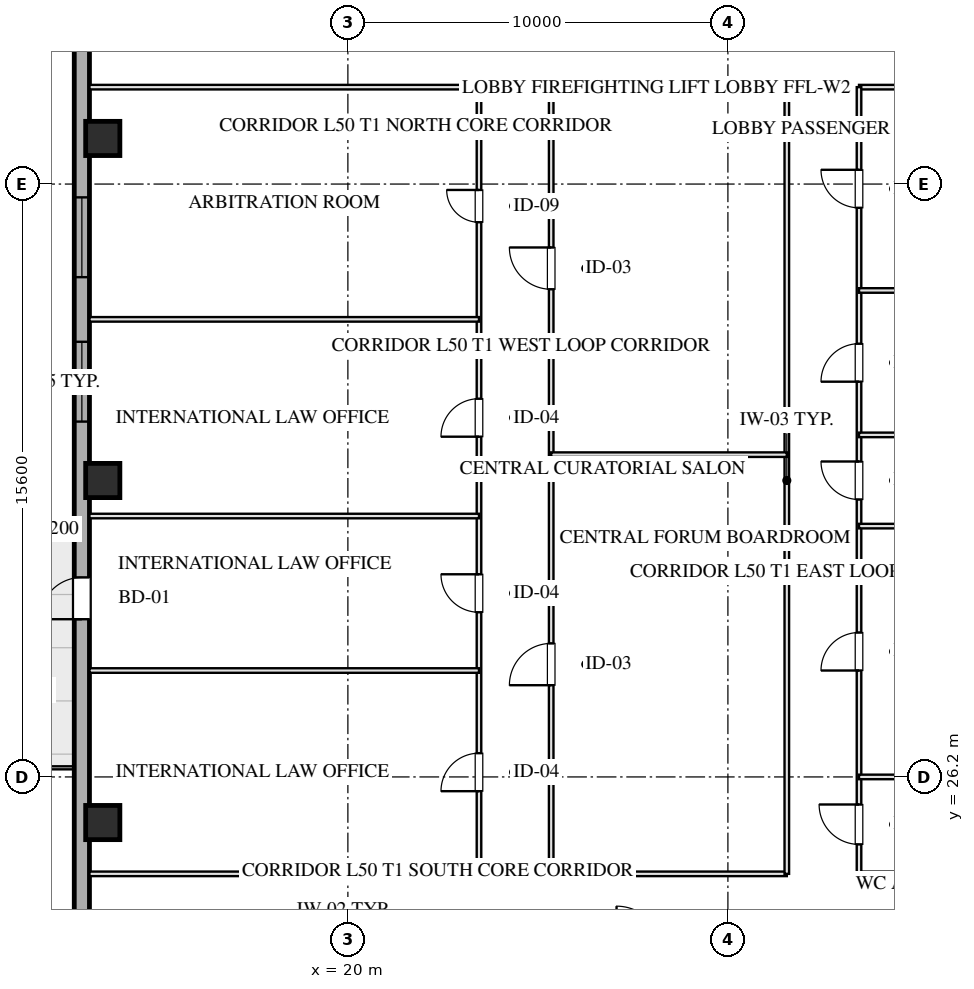
"""IFC4 building model, lengths in metres.
Left out: names, types, materials, properties, quantities, classifications, styles, units other than length and angle.
Written with IfcOpenShell. Run it as: python <this file> out.ifc"""

import sys

from ifc_helpers import new_model, si_unit, direction, frame, frame_2d, origin, origin_2d, place, context, subcontext, project, spatial, rectangle, hollow_rectangle, extrude, element, fill, save


model = new_model("IFC4")
c1 = context("Model", 3, precision=1e-05, world=origin(), true_north=direction((0.0, 1.0)))
c2 = subcontext(c1, "Body", "Model", "MODEL_VIEW")
j1 = project(units=[si_unit("LENGTHUNIT", "METRE"), si_unit("PLANEANGLEUNIT", "RADIAN")], contexts=[c1])
p1 = place(None, origin())
s1 = spatial("IfcSite", under=j1, at=p1, CompositionType="ELEMENT")
p2 = place(p1, origin())
s2 = spatial("IfcBuilding", under=s1, at=p2, CompositionType="ELEMENT")
p3 = place(p2, frame((0.0, 0.0, 188.6)))
s3 = spatial("IfcBuildingStorey", under=s2, at=p3, CompositionType="ELEMENT", Elevation=188.6)
for number, where, z_axis, x_axis in (
    (1, (13.55, 25.0, 0.0), (0.0, 0.0, 1.0), (1.0, 0.0, 0.0)),
    (2, (13.55, 34.0, 0.0), (0.0, 0.0, 1.0), (1.0, 0.0, 0.0)),
    (3, (13.55, 43.0, 0.0), (0.0, 0.0, 1.0), (1.0, 0.0, 0.0)),
):
    element("IfcColumn", number, at=place(p3, frame(where, z_axis=z_axis, x_axis=x_axis)), inside=s3, PredefinedType="COLUMN", context=c2, shape_type="SweptSolid", body=[
        extrude(hollow_rectangle(XDim=0.9, YDim=0.9, WallThickness=0.032, at=origin_2d()), origin(), (0.0, 0.0, 1.0), 3.451),
    ])
p4 = place(p3, frame((13.0, 10.8, 0.0), z_axis=(0.0, 0.0, 1.0), x_axis=(0.0, 1.0, 0.0)))
e4 = element("IfcWall", 4, at=p4, inside=s3, PredefinedType="SOLIDWALL", context=c2, shape_type="SweptSolid", body=[
    extrude(rectangle(XDim=46.4, YDim=0.4, at=frame_2d((23.2, 0.0))), origin(), (0.0, 0.0, 1.0), 2.61),
])
p5 = place(p4, frame((24.75, 0.0, 0.75)))
e5 = element("IfcOpeningElement", 5, at=p5, cuts=e4, PredefinedType="OPENING", context=c2, shape_type="SweptSolid", body=[
    extrude(rectangle(XDim=2.1, YDim=1.46, at=frame_2d((1.05, 0.73))), frame((0.0, 0.21, 0.0), z_axis=(0.0, -1.0, 0.0), x_axis=(1.0, 0.0, 0.0)), (0.0, 0.0, 1.0), 0.42),
])
p6 = place(p4, frame((28.55, 0.0, 0.75)))
e6 = element("IfcOpeningElement", 6, at=p6, cuts=e4, PredefinedType="OPENING", context=c2, shape_type="SweptSolid", body=[
    extrude(rectangle(XDim=2.1, YDim=1.46, at=frame_2d((1.05, 0.73))), frame((0.0, 0.21, 0.0), z_axis=(0.0, -1.0, 0.0), x_axis=(1.0, 0.0, 0.0)), (0.0, 0.0, 1.0), 0.42),
])
p7 = place(p4, frame((19.55, 0.0, 0.0)))
e7 = element("IfcOpeningElement", 7, at=p7, cuts=e4, PredefinedType="OPENING", context=c2, shape_type="SweptSolid", body=[
    extrude(rectangle(XDim=1.1, YDim=2.15, at=frame_2d((0.55, 1.075))), frame((0.0, 0.21, 0.0), z_axis=(0.0, -1.0, 0.0), x_axis=(1.0, 0.0, 0.0)), (0.0, 0.0, 1.0), 0.42),
])
p8 = place(p3, frame((13.2, 23.65, 0.0), z_axis=(0.0, 0.0, 1.0), x_axis=(1.0, 0.0, 0.0)))
e8 = element("IfcWall", 8, at=p8, inside=s3, PredefinedType="PARTITIONING", context=c2, shape_type="SweptSolid", body=[
    extrude(rectangle(XDim=10.25, YDim=0.12, at=frame_2d((5.125, 0.0))), origin(), (0.0, 0.0, 1.0), 3.175),
])
p9 = place(p3, frame((25.35, 23.65, 0.0), z_axis=(0.0, 0.0, 1.0), x_axis=(1.0, 0.0, 0.0)))
e9 = element("IfcWall", 9, at=p9, inside=s3, PredefinedType="PARTITIONING", context=c2, shape_type="SweptSolid", body=[
    extrude(rectangle(XDim=6.2, YDim=0.12, at=frame_2d((3.1, 0.0))), origin(), (0.0, 0.0, 1.0), 3.175),
])
p10 = place(p3, frame((33.45, 23.65, 0.0), z_axis=(0.0, 0.0, 1.0), x_axis=(1.0, 0.0, 0.0)))
e10 = element("IfcWall", 10, at=p10, inside=s3, PredefinedType="PARTITIONING", context=c2, shape_type="SweptSolid", body=[
    extrude(rectangle(XDim=13.35, YDim=0.12, at=frame_2d((6.675, 0.0))), origin(), (0.0, 0.0, 1.0), 3.175),
])
p11 = place(p3, frame((13.2, 44.35, 0.0), z_axis=(0.0, 0.0, 1.0), x_axis=(1.0, 0.0, 0.0)))
e11 = element("IfcWall", 11, at=p11, inside=s3, PredefinedType="PARTITIONING", context=c2, shape_type="SweptSolid", body=[
    extrude(rectangle(XDim=10.25, YDim=0.12, at=frame_2d((5.125, 0.0))), origin(), (0.0, 0.0, 1.0), 3.175),
])
p12 = place(p3, frame((25.35, 44.35, 0.0), z_axis=(0.0, 0.0, 1.0), x_axis=(1.0, 0.0, 0.0)))
e12 = element("IfcWall", 12, at=p12, inside=s3, PredefinedType="PARTITIONING", context=c2, shape_type="SweptSolid", body=[
    extrude(rectangle(XDim=6.2, YDim=0.12, at=frame_2d((3.1, 0.0))), origin(), (0.0, 0.0, 1.0), 3.175),
])
p13 = place(p3, frame((33.45, 44.35, 0.0), z_axis=(0.0, 0.0, 1.0), x_axis=(1.0, 0.0, 0.0)))
e13 = element("IfcWall", 13, at=p13, inside=s3, PredefinedType="PARTITIONING", context=c2, shape_type="SweptSolid", body=[
    extrude(rectangle(XDim=13.35, YDim=0.12, at=frame_2d((6.675, 0.0))), origin(), (0.0, 0.0, 1.0), 3.175),
])
p14 = place(p3, frame((23.45, 23.65, 0.0), z_axis=(0.0, 0.0, 1.0), x_axis=(0.0, 1.0, 0.0)))
e14 = element("IfcWall", 14, at=p14, inside=s3, PredefinedType="PARTITIONING", context=c2, shape_type="SweptSolid", body=[
    extrude(rectangle(XDim=20.7, YDim=0.12, at=frame_2d((10.35, 0.0))), origin(), (0.0, 0.0, 1.0), 3.175),
])
p15 = place(p14, frame((2.175, 0.0, 0.0)))
e15 = element("IfcOpeningElement", 15, at=p15, cuts=e14, PredefinedType="OPENING", context=c2, shape_type="SweptSolid", body=[
    extrude(rectangle(XDim=1.0, YDim=2.05, at=frame_2d((0.5, 1.025))), frame((0.0, 0.07, 0.0), z_axis=(0.0, -1.0, 0.0), x_axis=(1.0, 0.0, 0.0)), (0.0, 0.0, 1.0), 0.14),
])
p16 = place(p14, frame((6.883, 0.0, 0.0)))
e16 = element("IfcOpeningElement", 16, at=p16, cuts=e14, PredefinedType="OPENING", context=c2, shape_type="SweptSolid", body=[
    extrude(rectangle(XDim=1.0, YDim=2.05, at=frame_2d((0.5, 1.025))), frame((0.0, 0.07, 0.0), z_axis=(0.0, -1.0, 0.0), x_axis=(1.0, 0.0, 0.0)), (0.0, 0.0, 1.0), 0.14),
])
p17 = place(p14, frame((11.502, 0.0, 0.0)))
e17 = element("IfcOpeningElement", 17, at=p17, cuts=e14, PredefinedType="OPENING", context=c2, shape_type="SweptSolid", body=[
    extrude(rectangle(XDim=1.0, YDim=2.05, at=frame_2d((0.5, 1.025))), frame((0.0, 0.07, 0.0), z_axis=(0.0, -1.0, 0.0), x_axis=(1.0, 0.0, 0.0)), (0.0, 0.0, 1.0), 0.14),
])
p18 = place(p14, frame((17.145, 0.0, 0.0)))
e18 = element("IfcOpeningElement", 18, at=p18, cuts=e14, PredefinedType="OPENING", context=c2, shape_type="SweptSolid", body=[
    extrude(rectangle(XDim=0.85, YDim=2.05, at=frame_2d((0.425, 1.025))), frame((0.0, 0.07, 0.0), z_axis=(0.0, -1.0, 0.0), x_axis=(1.0, 0.0, 0.0)), (0.0, 0.0, 1.0), 0.14),
])
p19 = place(p3, frame((25.35, 23.65, 0.0), z_axis=(0.0, 0.0, 1.0), x_axis=(0.0, 1.0, 0.0)))
e19 = element("IfcWall", 19, at=p19, inside=s3, PredefinedType="PARTITIONING", context=c2, shape_type="SweptSolid", body=[
    extrude(rectangle(XDim=20.7, YDim=0.12, at=frame_2d((10.35, 0.0))), origin(), (0.0, 0.0, 1.0), 3.175),
])
p20 = place(p19, frame((4.963, 0.0, 0.0)))
e20 = element("IfcOpeningElement", 20, at=p20, cuts=e19, PredefinedType="OPENING", context=c2, shape_type="SweptSolid", body=[
    extrude(rectangle(XDim=1.1, YDim=2.05, at=frame_2d((0.55, 1.025))), frame((0.0, 0.07, 0.0), z_axis=(0.0, -1.0, 0.0), x_axis=(1.0, 0.0, 0.0)), (0.0, 0.0, 1.0), 0.14),
])
p21 = place(p19, frame((15.382, 0.0, 0.0)))
e21 = element("IfcOpeningElement", 21, at=p21, cuts=e19, PredefinedType="OPENING", context=c2, shape_type="SweptSolid", body=[
    extrude(rectangle(XDim=1.1, YDim=2.05, at=frame_2d((0.55, 1.025))), frame((0.0, 0.07, 0.0), z_axis=(0.0, -1.0, 0.0), x_axis=(1.0, 0.0, 0.0)), (0.0, 0.0, 1.0), 0.14),
])
p22 = place(p3, frame((31.55, 23.65, 0.0), z_axis=(0.0, 0.0, 1.0), x_axis=(0.0, 1.0, 0.0)))
e22 = element("IfcWall", 22, at=p22, inside=s3, PredefinedType="PARTITIONING", context=c2, shape_type="SweptSolid", body=[
    extrude(rectangle(XDim=20.7, YDim=0.12, at=frame_2d((10.35, 0.0))), origin(), (0.0, 0.0, 1.0), 3.175),
])
p23 = place(p3, frame((33.45, 23.65, 0.0), z_axis=(0.0, 0.0, 1.0), x_axis=(0.0, 1.0, 0.0)))
e23 = element("IfcWall", 23, at=p23, inside=s3, PredefinedType="PARTITIONING", context=c2, shape_type="SweptSolid", body=[
    extrude(rectangle(XDim=20.7, YDim=0.12, at=frame_2d((10.35, 0.0))), origin(), (0.0, 0.0, 1.0), 3.175),
])
p24 = place(p23, frame((0.775, 0.0, 0.0)))
e24 = element("IfcOpeningElement", 24, at=p24, cuts=e23, PredefinedType="OPENING", context=c2, shape_type="SweptSolid", body=[
    extrude(rectangle(XDim=1.05, YDim=2.05, at=frame_2d((0.525, 1.025))), frame((0.0, 0.07, 0.0), z_axis=(0.0, -1.0, 0.0), x_axis=(1.0, 0.0, 0.0)), (0.0, 0.0, 1.0), 0.14),
])
p25 = place(p23, frame((5.35, 0.0, 0.0)))
e25 = element("IfcOpeningElement", 25, at=p25, cuts=e23, PredefinedType="OPENING", context=c2, shape_type="SweptSolid", body=[
    extrude(rectangle(XDim=1.0, YDim=2.05, at=frame_2d((0.5, 1.025))), frame((0.0, 0.07, 0.0), z_axis=(0.0, -1.0, 0.0), x_axis=(1.0, 0.0, 0.0)), (0.0, 0.0, 1.0), 0.14),
])
p26 = place(p23, frame((9.85, 0.0, 0.0)))
e26 = element("IfcOpeningElement", 26, at=p26, cuts=e23, PredefinedType="OPENING", context=c2, shape_type="SweptSolid", body=[
    extrude(rectangle(XDim=1.0, YDim=2.05, at=frame_2d((0.5, 1.025))), frame((0.0, 0.07, 0.0), z_axis=(0.0, -1.0, 0.0), x_axis=(1.0, 0.0, 0.0)), (0.0, 0.0, 1.0), 0.14),
])
p27 = place(p23, frame((12.95, 0.0, 0.0)))
e27 = element("IfcOpeningElement", 27, at=p27, cuts=e23, PredefinedType="OPENING", context=c2, shape_type="SweptSolid", body=[
    extrude(rectangle(XDim=1.0, YDim=2.05, at=frame_2d((0.5, 1.025))), frame((0.0, 0.07, 0.0), z_axis=(0.0, -1.0, 0.0), x_axis=(1.0, 0.0, 0.0)), (0.0, 0.0, 1.0), 0.14),
])
p28 = place(p23, frame((17.525, 0.0, 0.0)))
e28 = element("IfcOpeningElement", 28, at=p28, cuts=e23, PredefinedType="OPENING", context=c2, shape_type="SweptSolid", body=[
    extrude(rectangle(XDim=1.0, YDim=2.05, at=frame_2d((0.5, 1.025))), frame((0.0, 0.07, 0.0), z_axis=(0.0, -1.0, 0.0), x_axis=(1.0, 0.0, 0.0)), (0.0, 0.0, 1.0), 0.14),
])
p29 = place(p3, frame((25.35, 34.68, 0.0), z_axis=(0.0, 0.0, 1.0), x_axis=(1.0, 0.0, 0.0)))
e29 = element("IfcWall", 29, at=p29, inside=s3, PredefinedType="PARTITIONING", context=c2, shape_type="SweptSolid", body=[
    extrude(rectangle(XDim=6.2, YDim=0.12, at=frame_2d((3.1, 0.0))), origin(), (0.0, 0.0, 1.0), 3.175),
])
for number, where, z_axis, x_axis in (
    (30, (13.2, 29.0, 0.0), (0.0, 0.0, 1.0), (1.0, 0.0, 0.0)),
    (31, (13.2, 33.065, 0.0), (0.0, 0.0, 1.0), (1.0, 0.0, 0.0)),
    (32, (13.2, 38.24, 0.0), (0.0, 0.0, 1.0), (1.0, 0.0, 0.0)),
):
    element("IfcWall", number, at=place(p3, frame(where, z_axis=z_axis, x_axis=x_axis)), inside=s3, PredefinedType="PARTITIONING", context=c2, shape_type="SweptSolid", body=[
        extrude(rectangle(XDim=10.25, YDim=0.12, at=frame_2d((5.125, 0.0))), origin(), (0.0, 0.0, 1.0), 3.175),
    ])
for number, where, z_axis, x_axis in (
    (33, (33.45, 26.2, 0.0), (0.0, 0.0, 1.0), (1.0, 0.0, 0.0)),
    (34, (33.45, 32.8, 0.0), (0.0, 0.0, 1.0), (1.0, 0.0, 0.0)),
    (35, (33.45, 35.2, 0.0), (0.0, 0.0, 1.0), (1.0, 0.0, 0.0)),
    (36, (33.45, 39.0, 0.0), (0.0, 0.0, 1.0), (1.0, 0.0, 0.0)),
):
    element("IfcWall", number, at=place(p3, frame(where, z_axis=z_axis, x_axis=x_axis)), inside=s3, PredefinedType="PARTITIONING", context=c2, shape_type="SweptSolid", body=[
        extrude(rectangle(XDim=13.35, YDim=0.12, at=frame_2d((6.675, 0.0))), origin(), (0.0, 0.0, 1.0), 3.175),
    ])
p30 = place(p5, origin())
e37 = element("IfcWindow", 37, at=p30, inside=s3, PartitioningType="TRIPLE_PANEL_VERTICAL", PredefinedType="WINDOW", context=c2, shape_type="SweptSolid", body=[
    extrude(rectangle(XDim=2.1, YDim=1.46, at=frame_2d((1.05, 0.73))), frame((0.0, 0.03, 0.0), z_axis=(0.0, -1.0, 0.0), x_axis=(1.0, 0.0, 0.0)), (0.0, 0.0, 1.0), 0.06),
])
fill(e5, e37)
p31 = place(p6, origin())
e38 = element("IfcWindow", 38, at=p31, inside=s3, PartitioningType="TRIPLE_PANEL_VERTICAL", PredefinedType="WINDOW", context=c2, shape_type="SweptSolid", body=[
    extrude(rectangle(XDim=2.1, YDim=1.46, at=frame_2d((1.05, 0.73))), frame((0.0, 0.03, 0.0), z_axis=(0.0, -1.0, 0.0), x_axis=(1.0, 0.0, 0.0)), (0.0, 0.0, 1.0), 0.06),
])
fill(e6, e38)
p32 = place(p7, origin())
e39 = element("IfcDoor", 39, at=p32, inside=s3, OperationType="SINGLE_SWING_LEFT", PredefinedType="DOOR", context=c2, shape_type="SweptSolid", body=[
    extrude(rectangle(XDim=1.1, YDim=2.15, at=frame_2d((0.55, 1.075))), frame((0.0, 0.025, 0.0), z_axis=(0.0, -1.0, 0.0), x_axis=(1.0, 0.0, 0.0)), (0.0, 0.0, 1.0), 0.05),
])
fill(e7, e39)
p33 = place(p15, origin())
e40 = element("IfcDoor", 40, at=p33, inside=s3, OperationType="SINGLE_SWING_LEFT", PredefinedType="DOOR", context=c2, shape_type="SweptSolid", body=[
    extrude(rectangle(XDim=1.0, YDim=2.05, at=frame_2d((0.5, 1.025))), frame((0.0, 0.025, 0.0), z_axis=(0.0, -1.0, 0.0), x_axis=(1.0, 0.0, 0.0)), (0.0, 0.0, 1.0), 0.05),
])
fill(e15, e40)
p34 = place(p16, origin())
e41 = element("IfcDoor", 41, at=p34, inside=s3, OperationType="SINGLE_SWING_RIGHT", PredefinedType="DOOR", context=c2, shape_type="SweptSolid", body=[
    extrude(rectangle(XDim=1.0, YDim=2.05, at=frame_2d((0.5, 1.025))), frame((0.0, 0.025, 0.0), z_axis=(0.0, -1.0, 0.0), x_axis=(1.0, 0.0, 0.0)), (0.0, 0.0, 1.0), 0.05),
])
fill(e16, e41)
p35 = place(p17, origin())
e42 = element("IfcDoor", 42, at=p35, inside=s3, OperationType="SINGLE_SWING_LEFT", PredefinedType="DOOR", context=c2, shape_type="SweptSolid", body=[
    extrude(rectangle(XDim=1.0, YDim=2.05, at=frame_2d((0.5, 1.025))), frame((0.0, 0.025, 0.0), z_axis=(0.0, -1.0, 0.0), x_axis=(1.0, 0.0, 0.0)), (0.0, 0.0, 1.0), 0.05),
])
fill(e17, e42)
p36 = place(p18, origin())
e43 = element("IfcDoor", 43, at=p36, inside=s3, OperationType="SINGLE_SWING_RIGHT", PredefinedType="DOOR", context=c2, shape_type="SweptSolid", body=[
    extrude(rectangle(XDim=0.85, YDim=2.05, at=frame_2d((0.425, 1.025))), frame((0.0, 0.025, 0.0), z_axis=(0.0, -1.0, 0.0), x_axis=(1.0, 0.0, 0.0)), (0.0, 0.0, 1.0), 0.05),
])
fill(e18, e43)
p37 = place(p20, origin())
e44 = element("IfcDoor", 44, at=p37, inside=s3, OperationType="SINGLE_SWING_LEFT", PredefinedType="DOOR", context=c2, shape_type="SweptSolid", body=[
    extrude(rectangle(XDim=1.1, YDim=2.05, at=frame_2d((0.55, 1.025))), frame((0.0, 0.025, 0.0), z_axis=(0.0, -1.0, 0.0), x_axis=(1.0, 0.0, 0.0)), (0.0, 0.0, 1.0), 0.05),
])
fill(e20, e44)
p38 = place(p21, origin())
e45 = element("IfcDoor", 45, at=p38, inside=s3, OperationType="SINGLE_SWING_RIGHT", PredefinedType="DOOR", context=c2, shape_type="SweptSolid", body=[
    extrude(rectangle(XDim=1.1, YDim=2.05, at=frame_2d((0.55, 1.025))), frame((0.0, 0.025, 0.0), z_axis=(0.0, -1.0, 0.0), x_axis=(1.0, 0.0, 0.0)), (0.0, 0.0, 1.0), 0.05),
])
fill(e21, e45)
p39 = place(p24, origin())
e46 = element("IfcDoor", 46, at=p39, inside=s3, OperationType="SINGLE_SWING_RIGHT", PredefinedType="DOOR", context=c2, shape_type="SweptSolid", body=[
    extrude(rectangle(XDim=1.05, YDim=2.05, at=frame_2d((0.525, 1.025))), frame((0.0, 0.025, 0.0), z_axis=(0.0, -1.0, 0.0), x_axis=(1.0, 0.0, 0.0)), (0.0, 0.0, 1.0), 0.05),
])
fill(e24, e46)
p40 = place(p25, origin())
e47 = element("IfcDoor", 47, at=p40, inside=s3, OperationType="SINGLE_SWING_LEFT", PredefinedType="DOOR", context=c2, shape_type="SweptSolid", body=[
    extrude(rectangle(XDim=1.0, YDim=2.05, at=frame_2d((0.5, 1.025))), frame((0.0, 0.025, 0.0), z_axis=(0.0, -1.0, 0.0), x_axis=(1.0, 0.0, 0.0)), (0.0, 0.0, 1.0), 0.05),
])
fill(e25, e47)
p41 = place(p26, origin())
e48 = element("IfcDoor", 48, at=p41, inside=s3, OperationType="SINGLE_SWING_RIGHT", PredefinedType="DOOR", context=c2, shape_type="SweptSolid", body=[
    extrude(rectangle(XDim=1.0, YDim=2.05, at=frame_2d((0.5, 1.025))), frame((0.0, 0.025, 0.0), z_axis=(0.0, -1.0, 0.0), x_axis=(1.0, 0.0, 0.0)), (0.0, 0.0, 1.0), 0.05),
])
fill(e26, e48)
p42 = place(p27, origin())
e49 = element("IfcDoor", 49, at=p42, inside=s3, OperationType="SINGLE_SWING_LEFT", PredefinedType="DOOR", context=c2, shape_type="SweptSolid", body=[
    extrude(rectangle(XDim=1.0, YDim=2.05, at=frame_2d((0.5, 1.025))), frame((0.0, 0.025, 0.0), z_axis=(0.0, -1.0, 0.0), x_axis=(1.0, 0.0, 0.0)), (0.0, 0.0, 1.0), 0.05),
])
fill(e27, e49)
p43 = place(p28, origin())
e50 = element("IfcDoor", 50, at=p43, inside=s3, OperationType="SINGLE_SWING_RIGHT", PredefinedType="DOOR", context=c2, shape_type="SweptSolid", body=[
    extrude(rectangle(XDim=1.0, YDim=2.05, at=frame_2d((0.5, 1.025))), frame((0.0, 0.025, 0.0), z_axis=(0.0, -1.0, 0.0), x_axis=(1.0, 0.0, 0.0)), (0.0, 0.0, 1.0), 0.05),
])
fill(e28, e50)
save(model, sys.argv[1])
